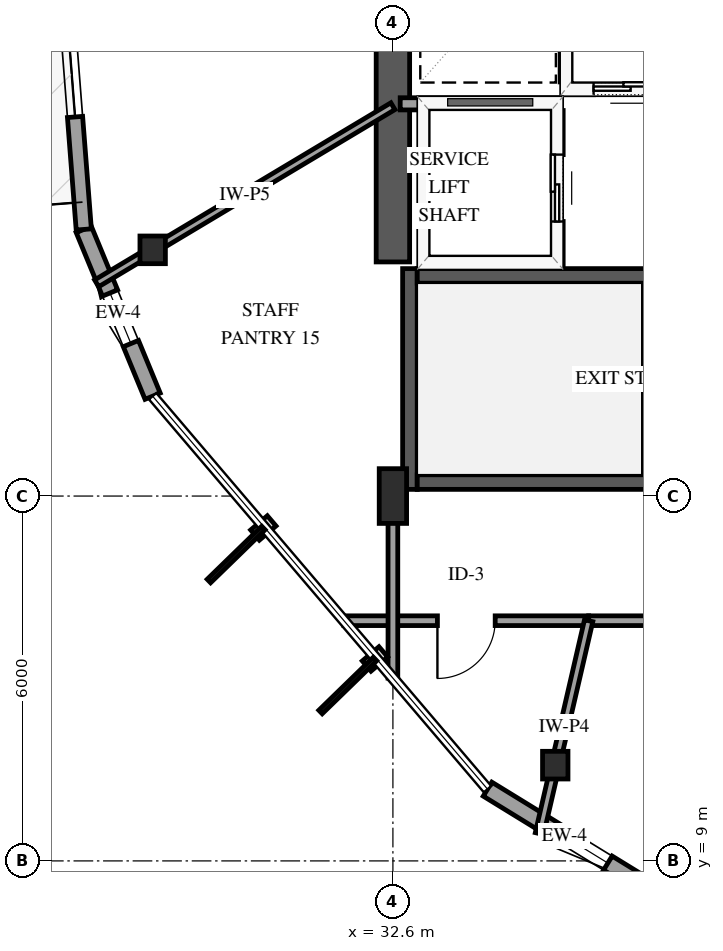
"""IFC4 building model, lengths in metres.
Left out: names, types, materials, properties, quantities, classifications, styles, units other than length and angle.
Written with IfcOpenShell. Run it as: python <this file> out.ifc"""

import sys

from ifc_helpers import new_model, si_unit, direction, frame, frame_2d, origin, origin_2d, place, context, subcontext, project, spatial, rectangle, i_section, extrude, element, fill, save


model = new_model("IFC4")
c1 = context("Model", 3, precision=1e-05, world=origin(), true_north=direction((0.0, 1.0)))
c2 = subcontext(c1, "Body", "Model", "MODEL_VIEW")
j1 = project(units=[si_unit("LENGTHUNIT", "METRE"), si_unit("PLANEANGLEUNIT", "RADIAN")], contexts=[c1])
p1 = place(None, origin())
s1 = spatial("IfcSite", under=j1, at=p1, CompositionType="ELEMENT")
p2 = place(p1, origin())
s2 = spatial("IfcBuilding", under=s1, at=p2, CompositionType="ELEMENT")
p3 = place(p2, frame((0.0, 0.0, 114.7)))
s3 = spatial("IfcBuildingStorey", under=s2, at=p3, CompositionType="ELEMENT", Elevation=114.7)
p4 = place(p3, frame((32.88, 15.11, 0.0), z_axis=(0.0, 0.0, 1.0), x_axis=(0.0, 1.0, 0.0)))
e1 = element("IfcWall", 1, at=p4, inside=s3, PredefinedType="SHEAR", context=c2, shape_type="SweptSolid", body=[
    extrude(rectangle(XDim=3.63, YDim=0.24, at=frame_2d((1.815, 0.0))), origin(), (0.0, 0.0, 1.0), 3.9),
])
for number, where, z_axis, x_axis in (
    (2, (33.0, 15.23, 0.0), (0.0, 0.0, 1.0), (1.0, 0.0, 0.0)),
    (3, (33.0, 18.62, 0.0), (0.0, 0.0, 1.0), (1.0, 0.0, 0.0)),
):
    element("IfcWall", number, at=place(p3, frame(where, z_axis=z_axis, x_axis=x_axis)), inside=s3, PredefinedType="SHEAR", context=c2, shape_type="SweptSolid", body=[
        extrude(rectangle(XDim=8.0, YDim=0.24, at=frame_2d((4.0, 0.0))), origin(), (0.0, 0.0, 1.0), 3.9),
    ])
p5 = place(p3, frame((32.6, 18.85, 0.0), z_axis=(0.0, 0.0, 1.0), x_axis=(0.0, 1.0, 0.0)))
e4 = element("IfcWall", 4, at=p5, inside=s3, PredefinedType="SHEAR", context=c2, shape_type="SweptSolid", body=[
    extrude(rectangle(XDim=12.3, YDim=0.55, at=frame_2d((6.15, 0.0))), origin(), (0.0, 0.0, 1.0), 3.9),
])
p6 = place(p3, frame((32.6, 15.0, 0.0), z_axis=(0.0, 0.0, 1.0), x_axis=(1.0, 0.0, 0.0)))
e5 = element("IfcColumn", 5, at=p6, inside=s3, PredefinedType="PILASTER", context=c2, shape_type="SweptSolid", body=[
    extrude(rectangle(XDim=0.45, YDim=0.9, at=origin_2d()), origin(), (0.0, 0.0, 1.0), 3.9),
])
for number, where, z_axis, x_axis in (
    (6, (28.649, 19.049, 0.0), (0.0, 0.0, 1.0), (1.0, 0.0, 0.0)),
    (7, (35.27, 10.575, 0.0), (0.0, 0.0, 1.0), (1.0, 0.0, 0.0)),
):
    element("IfcColumn", number, at=place(p3, frame(where, z_axis=z_axis, x_axis=x_axis)), inside=s3, PredefinedType="COLUMN", context=c2, shape_type="SweptSolid", body=[
        extrude(i_section(OverallWidth=0.418, OverallDepth=0.455, WebThickness=0.042, FlangeThickness=0.068, FilletRadius=0.038, at=origin_2d()), origin(), (0.0, 0.0, 1.0), 3.9),
    ])
p7 = place(p3, frame((27.516, 19.384, 0.0), z_axis=(0.0, 0.0, 1.0), x_axis=(0.381767795874, -0.9242582702, 0.0)))
e8 = element("IfcWall", 8, at=p7, inside=s3, PredefinedType="SOLIDWALL", context=c2, shape_type="SweptSolid", body=[
    extrude(rectangle(XDim=2.967, YDim=0.27, at=frame_2d((1.483, 0.0))), origin(), (0.0, 0.0, 1.0), 2.979),
])
p8 = place(p7, frame((1.131, 0.0, 0.75)))
e9 = element("IfcOpeningElement", 9, at=p8, cuts=e8, PredefinedType="OPENING", context=c2, shape_type="SweptSolid", body=[
    extrude(rectangle(XDim=0.9, YDim=1.5, at=frame_2d((0.45, 0.75))), frame((0.0, 0.145, 0.0), z_axis=(0.0, -1.0, 0.0), x_axis=(1.0, 0.0, 0.0)), (0.0, 0.0, 1.0), 0.29),
])
p9 = place(p3, frame((26.859, 27.85, 0.0), z_axis=(0.0, 0.0, 1.0), x_axis=(0.077404492849, -0.996999771558, 0.0)))
e10 = element("IfcWall", 10, at=p9, inside=s3, PredefinedType="SOLIDWALL", context=c2, shape_type="SweptSolid", body=[
    extrude(rectangle(XDim=8.491, YDim=0.25, at=frame_2d((4.245, 0.0))), origin(), (0.0, 0.0, 1.0), 2.979),
])
p10 = place(p9, frame((3.745, 0.0, 0.0)))
e11 = element("IfcOpeningElement", 11, at=p10, cuts=e10, PredefinedType="OPENING", context=c2, shape_type="SweptSolid", body=[
    extrude(rectangle(XDim=1.05, YDim=2.15, at=frame_2d((0.525, 1.075))), frame((0.0, 0.135, 0.0), z_axis=(0.0, -1.0, 0.0), x_axis=(1.0, 0.0, 0.0)), (0.0, 0.0, 1.0), 0.27),
])
p11 = place(p9, frame((0.44, 0.0, 0.72)))
e12 = element("IfcOpeningElement", 12, at=p11, cuts=e10, PredefinedType="OPENING", context=c2, shape_type="SweptSolid", body=[
    extrude(rectangle(XDim=1.2, YDim=1.6, at=frame_2d((0.6, 0.8))), frame((0.0, 0.135, 0.0), z_axis=(0.0, -1.0, 0.0), x_axis=(1.0, 0.0, 0.0)), (0.0, 0.0, 1.0), 0.27),
])
p12 = place(p9, frame((5.435, 0.0, 0.72)))
e13 = element("IfcOpeningElement", 13, at=p12, cuts=e10, PredefinedType="OPENING", context=c2, shape_type="SweptSolid", body=[
    extrude(rectangle(XDim=1.2, YDim=1.6, at=frame_2d((0.6, 0.8))), frame((0.0, 0.135, 0.0), z_axis=(0.0, -1.0, 0.0), x_axis=(1.0, 0.0, 0.0)), (0.0, 0.0, 1.0), 0.27),
])
p13 = place(p3, frame((34.156, 10.18, 0.0), z_axis=(0.0, 0.0, 1.0), x_axis=(0.852087521371, -0.523399327402, 0.0)))
e14 = element("IfcWall", 14, at=p13, inside=s3, PredefinedType="SOLIDWALL", context=c2, shape_type="SweptSolid", body=[
    extrude(rectangle(XDim=2.967, YDim=0.27, at=frame_2d((1.483, 0.0))), origin(), (0.0, 0.0, 1.0), 2.979),
])
p14 = place(p13, frame((1.422, 0.0, 0.75)))
e15 = element("IfcOpeningElement", 15, at=p14, cuts=e14, PredefinedType="OPENING", context=c2, shape_type="SweptSolid", body=[
    extrude(rectangle(XDim=0.9, YDim=1.5, at=frame_2d((0.45, 0.75))), frame((0.0, 0.145, 0.0), z_axis=(0.0, -1.0, 0.0), x_axis=(1.0, 0.0, 0.0)), (0.0, 0.0, 1.0), 0.29),
])
p15 = place(p3, frame((35.45, 21.7, 0.0), z_axis=(0.0, 0.0, 1.0), x_axis=(1.0, 0.0, 0.0)))
e16 = element("IfcWall", 16, at=p15, inside=s3, PredefinedType="SOLIDWALL", context=c2, shape_type="SweptSolid", body=[
    extrude(rectangle(XDim=2.0, YDim=0.2, at=frame_2d((1.0, 0.0))), origin(), (0.0, 0.0, 1.0), 3.6),
])
p16 = place(p15, frame((0.45, 0.0, 0.0)))
e17 = element("IfcOpeningElement", 17, at=p16, cuts=e16, PredefinedType="OPENING", context=c2, shape_type="SweptSolid", body=[
    extrude(rectangle(XDim=1.1, YDim=2.15, at=frame_2d((0.55, 1.075))), frame((0.0, 0.11, 0.0), z_axis=(0.0, -1.0, 0.0), x_axis=(1.0, 0.0, 0.0)), (0.0, 0.0, 1.0), 0.22),
])
p17 = place(p3, frame((35.45, 21.81, 0.0), z_axis=(0.0, 0.0, 1.0), x_axis=(0.0, 1.0, 0.0)))
e18 = element("IfcWall", 18, at=p17, inside=s3, PredefinedType="SOLIDWALL", context=c2, shape_type="SweptSolid", body=[
    extrude(rectangle(XDim=2.38, YDim=0.2, at=frame_2d((1.19, 0.0))), origin(), (0.0, 0.0, 1.0), 3.6),
])
p18 = place(p3, frame((32.72, 21.45, 0.0), z_axis=(0.0, 0.0, 1.0), x_axis=(1.0, 0.0, 0.0)))
e19 = element("IfcWall", 19, at=p18, inside=s3, PredefinedType="SOLIDWALL", context=c2, shape_type="SweptSolid", body=[
    extrude(rectangle(XDim=2.58, YDim=0.2, at=frame_2d((1.29, 0.0))), origin(), (0.0, 0.0, 1.0), 3.6),
])
p19 = place(p3, frame((35.3, 18.79, 0.0), z_axis=(0.0, 0.0, 1.0), x_axis=(0.0, 1.0, 0.0)))
e20 = element("IfcWall", 20, at=p19, inside=s3, PredefinedType="SOLIDWALL", context=c2, shape_type="SweptSolid", body=[
    extrude(rectangle(XDim=2.55, YDim=0.2, at=frame_2d((1.275, 0.0))), origin(), (0.0, 0.0, 1.0), 3.6),
])
p20 = place(p19, frame((0.725, 0.0, 0.0)))
e21 = element("IfcOpeningElement", 21, at=p20, cuts=e20, PredefinedType="OPENING", context=c2, shape_type="SweptSolid", body=[
    extrude(rectangle(XDim=1.1, YDim=2.15, at=frame_2d((0.55, 1.075))), frame((0.0, 0.11, 0.0), z_axis=(0.0, -1.0, 0.0), x_axis=(1.0, 0.0, 0.0)), (0.0, 0.0, 1.0), 0.22),
])
p21 = place(p3, frame((43.455, 12.95, 0.0), z_axis=(0.0, 0.0, 1.0), x_axis=(-1.0, 0.0, 0.0)))
e22 = element("IfcWall", 22, at=p21, inside=s3, PredefinedType="PARTITIONING", context=c2, shape_type="SweptSolid", body=[
    extrude(rectangle(XDim=7.636, YDim=0.16, at=frame_2d((3.818, 0.0))), origin(), (0.0, 0.0, 1.0), 3.6),
])
p22 = place(p21, frame((3.343, 0.0, 0.0)))
e23 = element("IfcOpeningElement", 23, at=p22, cuts=e22, PredefinedType="OPENING", context=c2, shape_type="SweptSolid", body=[
    extrude(rectangle(XDim=0.95, YDim=2.15, at=frame_2d((0.475, 1.075))), frame((0.0, 0.09, 0.0), z_axis=(0.0, -1.0, 0.0), x_axis=(1.0, 0.0, 0.0)), (0.0, 0.0, 1.0), 0.18),
])
p23 = place(p3, frame((32.6, 21.411, 0.0), z_axis=(0.0, 0.0, 1.0), x_axis=(-0.858300195468, -0.513147907002, 0.0)))
e24 = element("IfcWall", 24, at=p23, inside=s3, PredefinedType="PARTITIONING", context=c2, shape_type="SweptSolid", body=[
    extrude(rectangle(XDim=5.677, YDim=0.13, at=frame_2d((2.838, 0.0))), origin(), (0.0, 0.0, 1.0), 2.978),
])
p24 = place(p3, frame((35.819, 12.95, 0.0), z_axis=(0.0, 0.0, 1.0), x_axis=(-1.0, 0.0, 0.0)))
e25 = element("IfcWall", 25, at=p24, inside=s3, PredefinedType="PARTITIONING", context=c2, shape_type="SweptSolid", body=[
    extrude(rectangle(XDim=4.024, YDim=0.16, at=frame_2d((2.012, 0.0))), origin(), (0.0, 0.0, 1.0), 3.6),
])
p25 = place(p24, frame((1.537, 0.0, 0.0)))
e26 = element("IfcOpeningElement", 26, at=p25, cuts=e25, PredefinedType="OPENING", context=c2, shape_type="SweptSolid", body=[
    extrude(rectangle(XDim=0.95, YDim=2.15, at=frame_2d((0.475, 1.075))), frame((0.0, 0.09, 0.0), z_axis=(0.0, -1.0, 0.0), x_axis=(1.0, 0.0, 0.0)), (0.0, 0.0, 1.0), 0.18),
])
p26 = place(p3, frame((35.819, 12.95, 0.0), z_axis=(0.0, 0.0, 1.0), x_axis=(-0.225167153037, -0.974320149229, 0.0)))
e27 = element("IfcWall", 27, at=p26, inside=s3, PredefinedType="PARTITIONING", context=c2, shape_type="SweptSolid", body=[
    extrude(rectangle(XDim=3.593, YDim=0.14, at=frame_2d((1.797, 0.0))), origin(), (0.0, 0.0, 1.0), 2.895),
])
p27 = place(p3, frame((32.6, 12.006, 0.0), z_axis=(0.0, 0.0, 1.0), x_axis=(0.0, 1.0, 0.0)))
e28 = element("IfcWall", 28, at=p27, inside=s3, PredefinedType="PARTITIONING", context=c2, shape_type="SweptSolid", body=[
    extrude(rectangle(XDim=2.924, YDim=0.16, at=frame_2d((1.462, 0.0))), origin(), (0.0, 0.0, 1.0), 3.6),
])
p28 = place(p8, origin())
e29 = element("IfcWindow", 29, at=p28, inside=s3, PartitioningType="SINGLE_PANEL", PredefinedType="WINDOW", context=c2, shape_type="SweptSolid", body=[
    extrude(rectangle(XDim=0.9, YDim=1.5, at=frame_2d((0.45, 0.75))), frame((0.0, 0.03, 0.0), z_axis=(0.0, -1.0, 0.0), x_axis=(1.0, 0.0, 0.0)), (0.0, 0.0, 1.0), 0.06),
])
fill(e9, e29)
p29 = place(p12, origin())
e30 = element("IfcWindow", 30, at=p29, inside=s3, PartitioningType="SINGLE_PANEL", PredefinedType="WINDOW", context=c2, shape_type="SweptSolid", body=[
    extrude(rectangle(XDim=1.2, YDim=1.6, at=frame_2d((0.6, 0.8))), frame((0.0, 0.03, 0.0), z_axis=(0.0, -1.0, 0.0), x_axis=(1.0, 0.0, 0.0)), (0.0, 0.0, 1.0), 0.06),
])
fill(e13, e30)
p30 = place(p14, origin())
e31 = element("IfcWindow", 31, at=p30, inside=s3, PartitioningType="SINGLE_PANEL", PredefinedType="WINDOW", context=c2, shape_type="SweptSolid", body=[
    extrude(rectangle(XDim=0.9, YDim=1.5, at=frame_2d((0.45, 0.75))), frame((0.0, 0.03, 0.0), z_axis=(0.0, -1.0, 0.0), x_axis=(1.0, 0.0, 0.0)), (0.0, 0.0, 1.0), 0.06),
])
fill(e15, e31)
p31 = place(p16, origin())
e32 = element("IfcDoor", 32, at=p31, inside=s3, OperationType="SLIDING_TO_LEFT", PredefinedType="DOOR", context=c2, shape_type="SweptSolid", body=[
    extrude(rectangle(XDim=1.1, YDim=2.15, at=frame_2d((0.55, 1.075))), frame((0.0, 0.025, 0.0), z_axis=(0.0, -1.0, 0.0), x_axis=(1.0, 0.0, 0.0)), (0.0, 0.0, 1.0), 0.05),
])
fill(e17, e32)
p32 = place(p20, origin())
e33 = element("IfcDoor", 33, at=p32, inside=s3, OperationType="SLIDING_TO_LEFT", PredefinedType="DOOR", context=c2, shape_type="SweptSolid", body=[
    extrude(rectangle(XDim=1.1, YDim=2.15, at=frame_2d((0.55, 1.075))), frame((0.0, 0.025, 0.0), z_axis=(0.0, -1.0, 0.0), x_axis=(1.0, 0.0, 0.0)), (0.0, 0.0, 1.0), 0.05),
])
fill(e21, e33)
p33 = place(p25, origin())
e34 = element("IfcDoor", 34, at=p33, inside=s3, OperationType="SINGLE_SWING_RIGHT", PredefinedType="DOOR", context=c2, shape_type="SweptSolid", body=[
    extrude(rectangle(XDim=0.95, YDim=2.15, at=frame_2d((0.475, 1.075))), frame((0.0, 0.025, 0.0), z_axis=(0.0, -1.0, 0.0), x_axis=(1.0, 0.0, 0.0)), (0.0, 0.0, 1.0), 0.05),
])
fill(e26, e34)
save(model, sys.argv[1])
